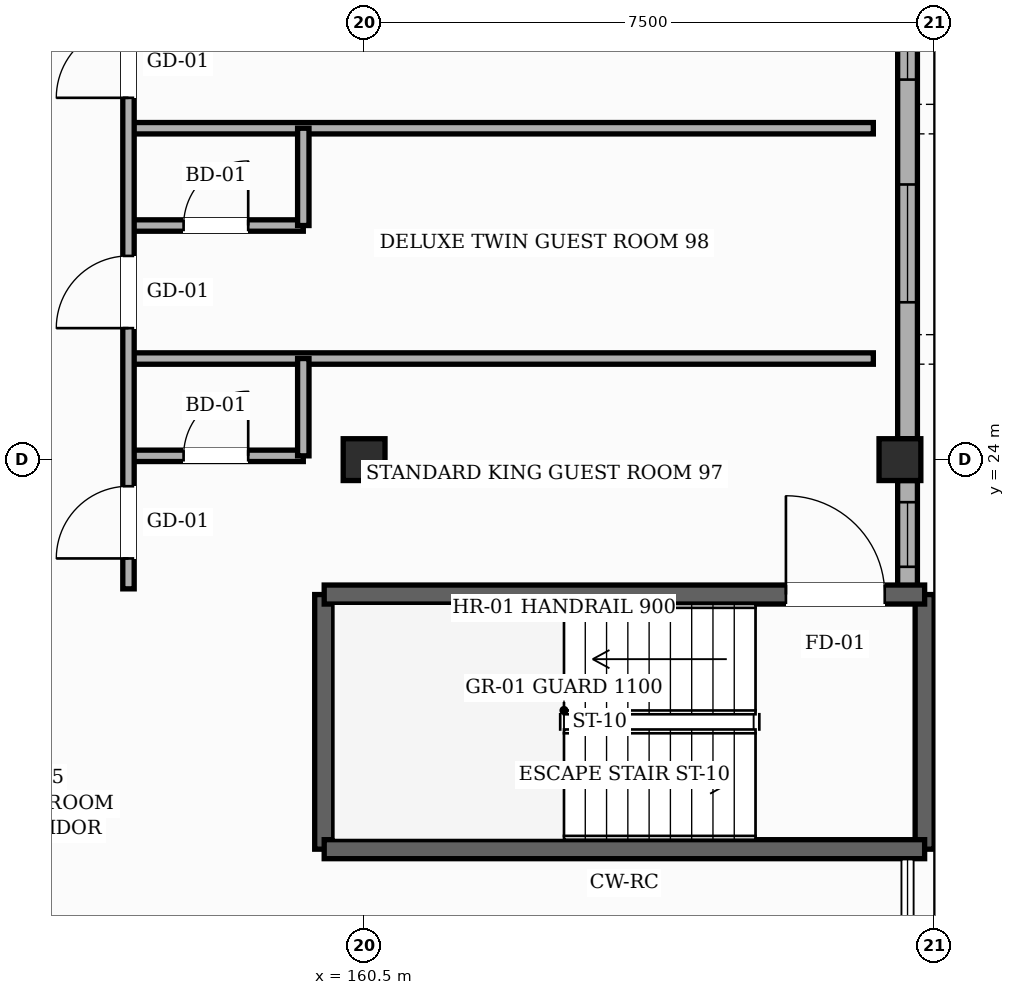
"""IFC4 building model, lengths in metres.
Left out: names, types, materials, properties, quantities, classifications, styles, units other than length and angle.
Written with IfcOpenShell. Run it as: python <this file> out.ifc"""

import sys

from ifc_helpers import new_model, si_unit, direction, frame, frame_2d, origin, origin_2d, place, context, subcontext, project, spatial, rectangle, hollow_rectangle, extrude, element, fill, save


model = new_model("IFC4")
c1 = context("Model", 3, precision=1e-05, world=origin(), true_north=direction((0.0, 1.0)))
c2 = subcontext(c1, "Body", "Model", "MODEL_VIEW")
j1 = project(units=[si_unit("LENGTHUNIT", "METRE"), si_unit("PLANEANGLEUNIT", "RADIAN")], contexts=[c1])
p1 = place(None, origin())
s1 = spatial("IfcSite", under=j1, at=p1, CompositionType="ELEMENT")
p2 = place(p1, origin())
s2 = spatial("IfcBuilding", under=s1, at=p2, CompositionType="ELEMENT")
p3 = place(p2, frame((0.0, 0.0, 24.6)))
s3 = spatial("IfcBuildingStorey", under=s2, at=p3, CompositionType="ELEMENT", Elevation=24.6)
for number, where, z_axis, x_axis in (
    (1, (160.5, 24.0, 0.0), (0.0, 0.0, 1.0), (1.0, 0.0, 0.0)),
    (2, (167.55, 24.0, 0.0), (0.0, 0.0, 1.0), (1.0, 0.0, 0.0)),
):
    element("IfcColumn", number, at=place(p3, frame(where, z_axis=z_axis, x_axis=x_axis)), inside=s3, PredefinedType="COLUMN", context=c2, shape_type="SweptSolid", body=[
        extrude(hollow_rectangle(XDim=0.55, YDim=0.55, WallThickness=0.022, InnerFilletRadius=0.022, OuterFilletRadius=0.044, at=origin_2d()), origin(), (0.0, 0.0, 1.0), 3.6),
    ])
p4 = place(p3, frame((167.65, 23.725, 0.0), z_axis=(0.0, 0.0, 1.0), x_axis=(0.0, -1.0, 0.0)))
e3 = element("IfcWall", 3, at=p4, inside=s3, PredefinedType="SOLIDWALL", context=c2, shape_type="SweptSolid", body=[
    extrude(rectangle(XDim=1.5, YDim=0.26, at=frame_2d((0.75, 0.0))), origin(), (0.0, 0.0, 1.0), 3.365),
])
p5 = place(p4, frame((0.285, 0.0, 0.85)))
e4 = element("IfcOpeningElement", 4, at=p5, cuts=e3, PredefinedType="OPENING", context=c2, shape_type="SweptSolid", body=[
    extrude(rectangle(XDim=0.85, YDim=1.35, at=frame_2d((0.425, 0.675))), frame((0.0, 0.14, 0.0), z_axis=(0.0, -1.0, 0.0), x_axis=(1.0, 0.0, 0.0)), (0.0, 0.0, 1.0), 0.28),
])
p6 = place(p3, frame((167.65, 31.725, 0.0), z_axis=(0.0, 0.0, 1.0), x_axis=(0.0, -1.0, 0.0)))
e5 = element("IfcWall", 5, at=p6, inside=s3, PredefinedType="SOLIDWALL", context=c2, shape_type="SweptSolid", body=[
    extrude(rectangle(XDim=7.45, YDim=0.26, at=frame_2d((3.725, 0.0))), origin(), (0.0, 0.0, 1.0), 2.755),
])
p7 = place(p6, frame((4.105, 0.0, 0.85)))
e6 = element("IfcOpeningElement", 6, at=p7, cuts=e5, PredefinedType="OPENING", context=c2, shape_type="SweptSolid", body=[
    extrude(rectangle(XDim=1.55, YDim=1.35, at=frame_2d((0.775, 0.675))), frame((0.0, 0.14, 0.0), z_axis=(0.0, -1.0, 0.0), x_axis=(1.0, 0.0, 0.0)), (0.0, 0.0, 1.0), 0.28),
])
p8 = place(p6, frame((0.975, 0.0, 0.85)))
e7 = element("IfcOpeningElement", 7, at=p8, cuts=e5, PredefinedType="OPENING", context=c2, shape_type="SweptSolid", body=[
    extrude(rectangle(XDim=1.75, YDim=1.35, at=frame_2d((0.875, 0.675))), frame((0.0, 0.14, 0.0), z_axis=(0.0, -1.0, 0.0), x_axis=(1.0, 0.0, 0.0)), (0.0, 0.0, 1.0), 0.28),
])
for number, where, z_axis, x_axis in (
    (8, (167.875, 22.225, 0.0), (0.0, 0.0, 1.0), (0.0, -1.0, 0.0)),
    (9, (159.975, 18.875, 0.0), (0.0, 0.0, 1.0), (0.0, 1.0, 0.0)),
):
    element("IfcWall", number, at=place(p3, frame(where, z_axis=z_axis, x_axis=x_axis)), inside=s3, PredefinedType="SHEAR", context=c2, shape_type="SweptSolid", body=[
        extrude(rectangle(XDim=3.35, YDim=0.25, at=frame_2d((1.675, 0.0))), origin(), (0.0, 0.0, 1.0), 3.38),
    ])
p9 = place(p3, frame((159.975, 22.225, 0.0), z_axis=(0.0, 0.0, 1.0), x_axis=(1.0, 0.0, 0.0)))
e10 = element("IfcWall", 10, at=p9, inside=s3, PredefinedType="SHEAR", context=c2, shape_type="SweptSolid", body=[
    extrude(rectangle(XDim=7.9, YDim=0.25, at=frame_2d((3.95, 0.0))), origin(), (0.0, 0.0, 1.0), 3.38),
])
p10 = place(p9, frame((6.075, 0.0, 0.0)))
e11 = element("IfcOpeningElement", 11, at=p10, cuts=e10, PredefinedType="OPENING", context=c2, shape_type="SweptSolid", body=[
    extrude(rectangle(XDim=1.3, YDim=2.2, at=frame_2d((0.65, 1.1))), frame((0.0, 0.135, 0.0), z_axis=(0.0, -1.0, 0.0), x_axis=(1.0, 0.0, 0.0)), (0.0, 0.0, 1.0), 0.27),
])
p11 = place(p3, frame((167.875, 18.875, 0.0), z_axis=(0.0, 0.0, 1.0), x_axis=(-1.0, 0.0, 0.0)))
e12 = element("IfcWall", 12, at=p11, inside=s3, PredefinedType="SHEAR", context=c2, shape_type="SweptSolid", body=[
    extrude(rectangle(XDim=7.9, YDim=0.25, at=frame_2d((3.95, 0.0))), origin(), (0.0, 0.0, 1.0), 3.38),
])
p12 = place(p3, frame((157.4, 24.05, 0.0), z_axis=(0.0, 0.0, 1.0), x_axis=(1.0, 0.0, 0.0)))
e13 = element("IfcWall", 13, at=p12, inside=s3, PredefinedType="PARTITIONING", context=c2, shape_type="SweptSolid", body=[
    extrude(rectangle(XDim=2.3, YDim=0.15, at=frame_2d((1.15, 0.0))), origin(), (0.0, 0.0, 1.0), 2.805),
])
p13 = place(p12, frame((0.725, 0.0, 0.0)))
e14 = element("IfcOpeningElement", 14, at=p13, cuts=e13, PredefinedType="OPENING", context=c2, shape_type="SweptSolid", body=[
    extrude(rectangle(XDim=0.85, YDim=2.1, at=frame_2d((0.425, 1.05))), frame((0.0, 0.085, 0.0), z_axis=(0.0, -1.0, 0.0), x_axis=(1.0, 0.0, 0.0)), (0.0, 0.0, 1.0), 0.17),
])
p14 = place(p3, frame((157.4, 25.33, 0.0), z_axis=(0.0, 0.0, 1.0), x_axis=(1.0, 0.0, 0.0)))
e15 = element("IfcWall", 15, at=p14, inside=s3, PredefinedType="PARTITIONING", context=c2, shape_type="SweptSolid", body=[
    extrude(rectangle(XDim=9.8, YDim=0.15, at=frame_2d((4.9, 0.0))), origin(), (0.0, 0.0, 1.0), 3.365),
])
p15 = place(p3, frame((157.4, 27.08, 0.0), z_axis=(0.0, 0.0, 1.0), x_axis=(1.0, 0.0, 0.0)))
e16 = element("IfcWall", 16, at=p15, inside=s3, PredefinedType="PARTITIONING", context=c2, shape_type="SweptSolid", body=[
    extrude(rectangle(XDim=2.3, YDim=0.15, at=frame_2d((1.15, 0.0))), origin(), (0.0, 0.0, 1.0), 3.365),
])
p16 = place(p15, frame((0.725, 0.0, 0.0)))
e17 = element("IfcOpeningElement", 17, at=p16, cuts=e16, PredefinedType="OPENING", context=c2, shape_type="SweptSolid", body=[
    extrude(rectangle(XDim=0.85, YDim=2.1, at=frame_2d((0.425, 1.05))), frame((0.0, 0.085, 0.0), z_axis=(0.0, -1.0, 0.0), x_axis=(1.0, 0.0, 0.0)), (0.0, 0.0, 1.0), 0.17),
])
p17 = place(p3, frame((157.4, 28.36, 0.0), z_axis=(0.0, 0.0, 1.0), x_axis=(1.0, 0.0, 0.0)))
e18 = element("IfcWall", 18, at=p17, inside=s3, PredefinedType="PARTITIONING", context=c2, shape_type="SweptSolid", body=[
    extrude(rectangle(XDim=9.8, YDim=0.15, at=frame_2d((4.9, 0.0))), origin(), (0.0, 0.0, 1.0), 3.365),
])
p18 = place(p3, frame((157.4, 22.3, 0.0), z_axis=(0.0, 0.0, 1.0), x_axis=(0.0, 1.0, 0.0)))
e19 = element("IfcWall", 19, at=p18, inside=s3, PredefinedType="PARTITIONING", context=c2, shape_type="SweptSolid", body=[
    extrude(rectangle(XDim=48.5, YDim=0.15, at=frame_2d((24.25, 0.0))), origin(), (0.0, 0.0, 1.0), 3.365),
])
p19 = place(p18, frame((0.4, 0.0, 0.0)))
e20 = element("IfcOpeningElement", 20, at=p19, cuts=e19, PredefinedType="OPENING", context=c2, shape_type="SweptSolid", body=[
    extrude(rectangle(XDim=0.95, YDim=2.15, at=frame_2d((0.475, 1.075))), frame((0.0, 0.085, 0.0), z_axis=(0.0, -1.0, 0.0), x_axis=(1.0, 0.0, 0.0)), (0.0, 0.0, 1.0), 0.17),
])
p20 = place(p18, frame((3.43, 0.0, 0.0)))
e21 = element("IfcOpeningElement", 21, at=p20, cuts=e19, PredefinedType="OPENING", context=c2, shape_type="SweptSolid", body=[
    extrude(rectangle(XDim=0.95, YDim=2.15, at=frame_2d((0.475, 1.075))), frame((0.0, 0.085, 0.0), z_axis=(0.0, -1.0, 0.0), x_axis=(1.0, 0.0, 0.0)), (0.0, 0.0, 1.0), 0.17),
])
p21 = place(p18, frame((6.46, 0.0, 0.0)))
e22 = element("IfcOpeningElement", 22, at=p21, cuts=e19, PredefinedType="OPENING", context=c2, shape_type="SweptSolid", body=[
    extrude(rectangle(XDim=0.95, YDim=2.15, at=frame_2d((0.475, 1.075))), frame((0.0, 0.085, 0.0), z_axis=(0.0, -1.0, 0.0), x_axis=(1.0, 0.0, 0.0)), (0.0, 0.0, 1.0), 0.17),
])
p22 = place(p18, frame((9.495, 0.0, 0.0)))
e23 = element("IfcOpeningElement", 23, at=p22, cuts=e19, PredefinedType="OPENING", context=c2, shape_type="SweptSolid", body=[
    extrude(rectangle(XDim=0.95, YDim=2.15, at=frame_2d((0.475, 1.075))), frame((0.0, 0.085, 0.0), z_axis=(0.0, -1.0, 0.0), x_axis=(1.0, 0.0, 0.0)), (0.0, 0.0, 1.0), 0.17),
])
p23 = place(p18, frame((12.525, 0.0, 0.0)))
e24 = element("IfcOpeningElement", 24, at=p23, cuts=e19, PredefinedType="OPENING", context=c2, shape_type="SweptSolid", body=[
    extrude(rectangle(XDim=0.95, YDim=2.15, at=frame_2d((0.475, 1.075))), frame((0.0, 0.085, 0.0), z_axis=(0.0, -1.0, 0.0), x_axis=(1.0, 0.0, 0.0)), (0.0, 0.0, 1.0), 0.17),
])
p24 = place(p18, frame((15.555, 0.0, 0.0)))
e25 = element("IfcOpeningElement", 25, at=p24, cuts=e19, PredefinedType="OPENING", context=c2, shape_type="SweptSolid", body=[
    extrude(rectangle(XDim=0.95, YDim=2.15, at=frame_2d((0.475, 1.075))), frame((0.0, 0.085, 0.0), z_axis=(0.0, -1.0, 0.0), x_axis=(1.0, 0.0, 0.0)), (0.0, 0.0, 1.0), 0.17),
])
p25 = place(p18, frame((18.585, 0.0, 0.0)))
e26 = element("IfcOpeningElement", 26, at=p25, cuts=e19, PredefinedType="OPENING", context=c2, shape_type="SweptSolid", body=[
    extrude(rectangle(XDim=0.95, YDim=2.15, at=frame_2d((0.475, 1.075))), frame((0.0, 0.085, 0.0), z_axis=(0.0, -1.0, 0.0), x_axis=(1.0, 0.0, 0.0)), (0.0, 0.0, 1.0), 0.17),
])
p26 = place(p18, frame((21.62, 0.0, 0.0)))
e27 = element("IfcOpeningElement", 27, at=p26, cuts=e19, PredefinedType="OPENING", context=c2, shape_type="SweptSolid", body=[
    extrude(rectangle(XDim=0.95, YDim=2.15, at=frame_2d((0.475, 1.075))), frame((0.0, 0.085, 0.0), z_axis=(0.0, -1.0, 0.0), x_axis=(1.0, 0.0, 0.0)), (0.0, 0.0, 1.0), 0.17),
])
p27 = place(p18, frame((24.65, 0.0, 0.0)))
e28 = element("IfcOpeningElement", 28, at=p27, cuts=e19, PredefinedType="OPENING", context=c2, shape_type="SweptSolid", body=[
    extrude(rectangle(XDim=0.95, YDim=2.15, at=frame_2d((0.475, 1.075))), frame((0.0, 0.085, 0.0), z_axis=(0.0, -1.0, 0.0), x_axis=(1.0, 0.0, 0.0)), (0.0, 0.0, 1.0), 0.17),
])
p28 = place(p18, frame((27.68, 0.0, 0.0)))
e29 = element("IfcOpeningElement", 29, at=p28, cuts=e19, PredefinedType="OPENING", context=c2, shape_type="SweptSolid", body=[
    extrude(rectangle(XDim=0.95, YDim=2.15, at=frame_2d((0.475, 1.075))), frame((0.0, 0.085, 0.0), z_axis=(0.0, -1.0, 0.0), x_axis=(1.0, 0.0, 0.0)), (0.0, 0.0, 1.0), 0.17),
])
p29 = place(p18, frame((30.71, 0.0, 0.0)))
e30 = element("IfcOpeningElement", 30, at=p29, cuts=e19, PredefinedType="OPENING", context=c2, shape_type="SweptSolid", body=[
    extrude(rectangle(XDim=0.95, YDim=2.15, at=frame_2d((0.475, 1.075))), frame((0.0, 0.085, 0.0), z_axis=(0.0, -1.0, 0.0), x_axis=(1.0, 0.0, 0.0)), (0.0, 0.0, 1.0), 0.17),
])
p30 = place(p18, frame((33.745, 0.0, 0.0)))
e31 = element("IfcOpeningElement", 31, at=p30, cuts=e19, PredefinedType="OPENING", context=c2, shape_type="SweptSolid", body=[
    extrude(rectangle(XDim=0.95, YDim=2.15, at=frame_2d((0.475, 1.075))), frame((0.0, 0.085, 0.0), z_axis=(0.0, -1.0, 0.0), x_axis=(1.0, 0.0, 0.0)), (0.0, 0.0, 1.0), 0.17),
])
p31 = place(p18, frame((36.775, 0.0, 0.0)))
e32 = element("IfcOpeningElement", 32, at=p31, cuts=e19, PredefinedType="OPENING", context=c2, shape_type="SweptSolid", body=[
    extrude(rectangle(XDim=0.95, YDim=2.15, at=frame_2d((0.475, 1.075))), frame((0.0, 0.085, 0.0), z_axis=(0.0, -1.0, 0.0), x_axis=(1.0, 0.0, 0.0)), (0.0, 0.0, 1.0), 0.17),
])
p32 = place(p18, frame((39.805, 0.0, 0.0)))
e33 = element("IfcOpeningElement", 33, at=p32, cuts=e19, PredefinedType="OPENING", context=c2, shape_type="SweptSolid", body=[
    extrude(rectangle(XDim=0.95, YDim=2.15, at=frame_2d((0.475, 1.075))), frame((0.0, 0.085, 0.0), z_axis=(0.0, -1.0, 0.0), x_axis=(1.0, 0.0, 0.0)), (0.0, 0.0, 1.0), 0.17),
])
p33 = place(p18, frame((42.84, 0.0, 0.0)))
e34 = element("IfcOpeningElement", 34, at=p33, cuts=e19, PredefinedType="OPENING", context=c2, shape_type="SweptSolid", body=[
    extrude(rectangle(XDim=0.95, YDim=2.15, at=frame_2d((0.475, 1.075))), frame((0.0, 0.085, 0.0), z_axis=(0.0, -1.0, 0.0), x_axis=(1.0, 0.0, 0.0)), (0.0, 0.0, 1.0), 0.17),
])
p34 = place(p18, frame((45.87, 0.0, 0.0)))
e35 = element("IfcOpeningElement", 35, at=p34, cuts=e19, PredefinedType="OPENING", context=c2, shape_type="SweptSolid", body=[
    extrude(rectangle(XDim=0.95, YDim=2.15, at=frame_2d((0.475, 1.075))), frame((0.0, 0.085, 0.0), z_axis=(0.0, -1.0, 0.0), x_axis=(1.0, 0.0, 0.0)), (0.0, 0.0, 1.0), 0.17),
])
for number, where, z_axis, x_axis in (
    (36, (159.7, 24.05, 0.0), (0.0, 0.0, 1.0), (0.0, 1.0, 0.0)),
    (37, (159.7, 27.08, 0.0), (0.0, 0.0, 1.0), (0.0, 1.0, 0.0)),
):
    element("IfcWall", number, at=place(p3, frame(where, z_axis=z_axis, x_axis=x_axis)), inside=s3, PredefinedType="PARTITIONING", context=c2, shape_type="SweptSolid", body=[
        extrude(rectangle(XDim=1.28, YDim=0.15, at=frame_2d((0.64, 0.0))), origin(), (0.0, 0.0, 1.0), 3.365),
    ])
p35 = place(p5, origin())
e38 = element("IfcWindow", 38, at=p35, inside=s3, PartitioningType="SINGLE_PANEL", PredefinedType="WINDOW", context=c2, shape_type="SweptSolid", body=[
    extrude(rectangle(XDim=0.85, YDim=1.35, at=frame_2d((0.425, 0.675))), frame((0.0, 0.03, 0.0), z_axis=(0.0, -1.0, 0.0), x_axis=(1.0, 0.0, 0.0)), (0.0, 0.0, 1.0), 0.06),
])
fill(e4, e38)
p36 = place(p7, origin())
e39 = element("IfcWindow", 39, at=p36, inside=s3, PartitioningType="SINGLE_PANEL", PredefinedType="WINDOW", context=c2, shape_type="SweptSolid", body=[
    extrude(rectangle(XDim=1.55, YDim=1.35, at=frame_2d((0.775, 0.675))), frame((0.0, 0.03, 0.0), z_axis=(0.0, -1.0, 0.0), x_axis=(1.0, 0.0, 0.0)), (0.0, 0.0, 1.0), 0.06),
])
fill(e6, e39)
p37 = place(p8, origin())
e40 = element("IfcWindow", 40, at=p37, inside=s3, PartitioningType="SINGLE_PANEL", PredefinedType="WINDOW", context=c2, shape_type="SweptSolid", body=[
    extrude(rectangle(XDim=1.75, YDim=1.35, at=frame_2d((0.875, 0.675))), frame((0.0, 0.03, 0.0), z_axis=(0.0, -1.0, 0.0), x_axis=(1.0, 0.0, 0.0)), (0.0, 0.0, 1.0), 0.06),
])
fill(e7, e40)
p38 = place(p10, origin())
e41 = element("IfcDoor", 41, at=p38, inside=s3, OperationType="SINGLE_SWING_LEFT", PredefinedType="DOOR", context=c2, shape_type="SweptSolid", body=[
    extrude(rectangle(XDim=1.3, YDim=2.2, at=frame_2d((0.65, 1.1))), frame((0.0, 0.025, 0.0), z_axis=(0.0, -1.0, 0.0), x_axis=(1.0, 0.0, 0.0)), (0.0, 0.0, 1.0), 0.05),
])
fill(e11, e41)
p39 = place(p19, origin())
e42 = element("IfcDoor", 42, at=p39, inside=s3, OperationType="SINGLE_SWING_LEFT", PredefinedType="DOOR", context=c2, shape_type="SweptSolid", body=[
    extrude(rectangle(XDim=0.95, YDim=2.15, at=frame_2d((0.475, 1.075))), frame((0.0, 0.025, 0.0), z_axis=(0.0, -1.0, 0.0), x_axis=(1.0, 0.0, 0.0)), (0.0, 0.0, 1.0), 0.05),
])
fill(e20, e42)
p40 = place(p13, origin())
e43 = element("IfcDoor", 43, at=p40, inside=s3, OperationType="SINGLE_SWING_RIGHT", PredefinedType="DOOR", context=c2, shape_type="SweptSolid", body=[
    extrude(rectangle(XDim=0.85, YDim=2.1, at=frame_2d((0.425, 1.05))), frame((0.0, 0.025, 0.0), z_axis=(0.0, -1.0, 0.0), x_axis=(1.0, 0.0, 0.0)), (0.0, 0.0, 1.0), 0.05),
])
fill(e14, e43)
p41 = place(p20, origin())
e44 = element("IfcDoor", 44, at=p41, inside=s3, OperationType="SINGLE_SWING_LEFT", PredefinedType="DOOR", context=c2, shape_type="SweptSolid", body=[
    extrude(rectangle(XDim=0.95, YDim=2.15, at=frame_2d((0.475, 1.075))), frame((0.0, 0.025, 0.0), z_axis=(0.0, -1.0, 0.0), x_axis=(1.0, 0.0, 0.0)), (0.0, 0.0, 1.0), 0.05),
])
fill(e21, e44)
p42 = place(p16, origin())
e45 = element("IfcDoor", 45, at=p42, inside=s3, OperationType="SINGLE_SWING_RIGHT", PredefinedType="DOOR", context=c2, shape_type="SweptSolid", body=[
    extrude(rectangle(XDim=0.85, YDim=2.1, at=frame_2d((0.425, 1.05))), frame((0.0, 0.025, 0.0), z_axis=(0.0, -1.0, 0.0), x_axis=(1.0, 0.0, 0.0)), (0.0, 0.0, 1.0), 0.05),
])
fill(e17, e45)
p43 = place(p21, origin())
e46 = element("IfcDoor", 46, at=p43, inside=s3, OperationType="SINGLE_SWING_LEFT", PredefinedType="DOOR", context=c2, shape_type="SweptSolid", body=[
    extrude(rectangle(XDim=0.95, YDim=2.15, at=frame_2d((0.475, 1.075))), frame((0.0, 0.025, 0.0), z_axis=(0.0, -1.0, 0.0), x_axis=(1.0, 0.0, 0.0)), (0.0, 0.0, 1.0), 0.05),
])
fill(e22, e46)
save(model, sys.argv[1])
